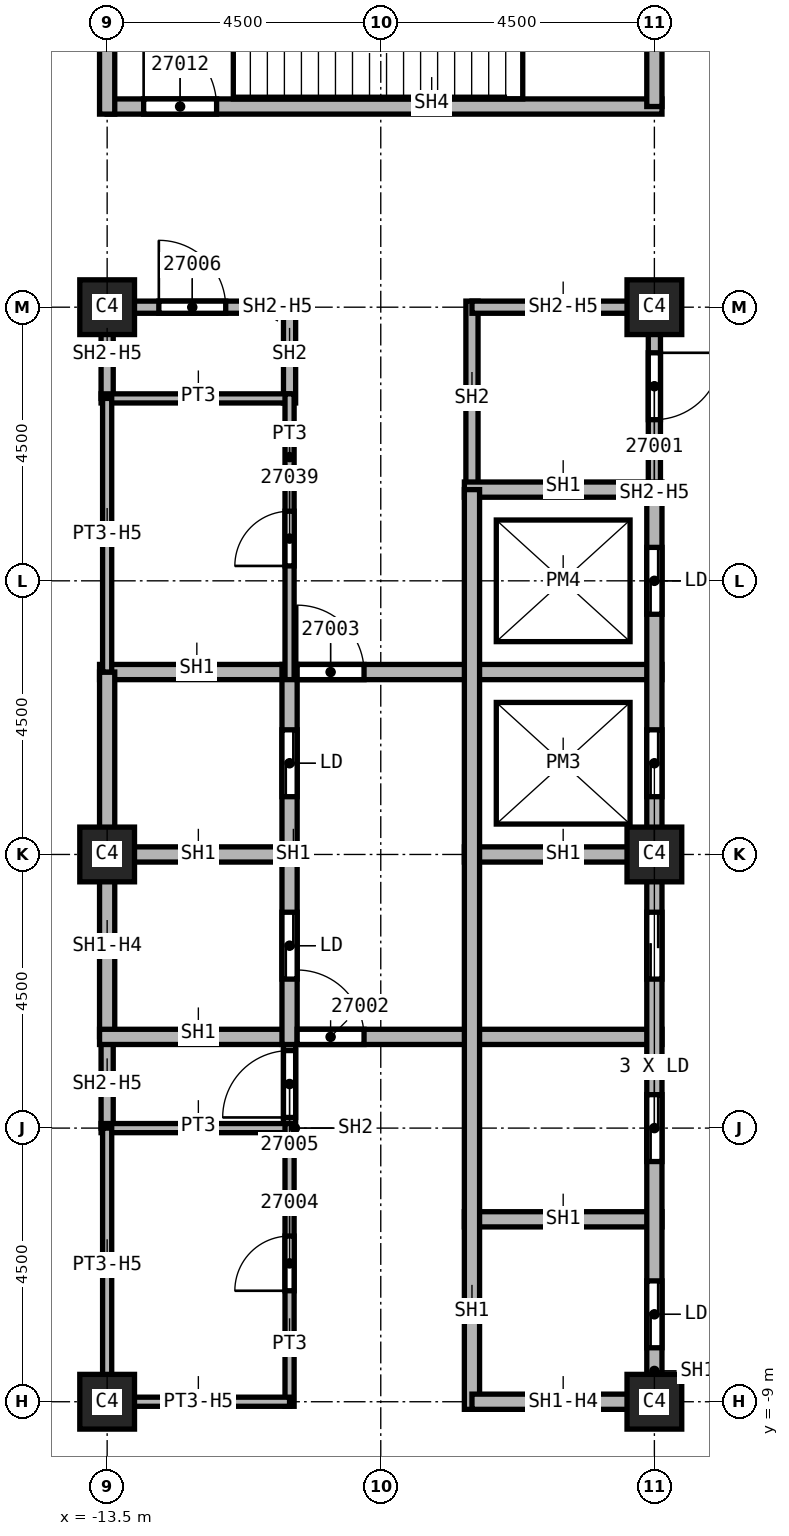
"""IFC4 building model, lengths in metres.
Left out: names, types, materials, properties, quantities, classifications, styles, units other than length and angle.
Written with IfcOpenShell. Run it as: python <this file> out.ifc"""

import sys

from ifc_helpers import new_model, si_unit, direction, frame, frame_2d, origin, origin_2d, place, context, subcontext, project, spatial, rectangle, extrude, element, fill, save


model = new_model("IFC4")
c1 = context("Model", 3, precision=1e-05, world=origin(), true_north=direction((0.0, 1.0)))
c2 = subcontext(c1, "Body", "Model", "MODEL_VIEW")
j1 = project(units=[si_unit("LENGTHUNIT", "METRE"), si_unit("PLANEANGLEUNIT", "RADIAN")], contexts=[c1])
p1 = place(None, origin())
s1 = spatial("IfcSite", under=j1, at=p1, CompositionType="ELEMENT")
p2 = place(p1, origin())
s2 = spatial("IfcBuilding", under=s1, at=p2, CompositionType="ELEMENT")
p3 = place(p2, frame((0.0, 0.0, 178.0)))
s3 = spatial("IfcBuildingStorey", under=s2, at=p3, CompositionType="ELEMENT", Elevation=178.0)
for number, where, z_axis, x_axis in (
    (1, (-4.5, 0.0, 0.0), (0.0, 0.0, 1.0), (1.0, 0.0, 0.0)),
    (2, (-4.5, 9.0, 0.0), (0.0, 0.0, 1.0), (1.0, 0.0, 0.0)),
    (3, (-4.5, -9.0, 0.0), (0.0, 0.0, 1.0), (1.0, 0.0, 0.0)),
    (4, (-13.5, 0.0, 0.0), (0.0, 0.0, 1.0), (1.0, 0.0, 0.0)),
    (5, (-13.5, 9.0, 0.0), (0.0, 0.0, 1.0), (1.0, 0.0, 0.0)),
    (6, (-13.5, -9.0, 0.0), (0.0, 0.0, 1.0), (1.0, 0.0, 0.0)),
):
    element("IfcColumn", number, at=place(p3, frame(where, z_axis=z_axis, x_axis=x_axis)), inside=s3, PredefinedType="COLUMN", context=c2, shape_type="SweptSolid", body=[
        extrude(rectangle(XDim=0.9, YDim=0.9, at=origin_2d()), origin(), (0.0, 0.0, 1.0), 5.72),
    ])
p4 = place(p3, frame((-13.5, -4.5, 0.0), z_axis=(0.0, 0.0, 1.0), x_axis=(0.0, 1.0, 0.0)))
e7 = element("IfcWall", 7, at=p4, inside=s3, PredefinedType="SOLIDWALL", context=c2, shape_type="SweptSolid", body=[
    extrude(rectangle(XDim=1.5, YDim=0.2, at=frame_2d((0.75, 0.0))), origin(), (0.0, 0.0, 1.0), 4.958),
])
p5 = place(p3, frame((-13.5, 7.5, 0.0), z_axis=(0.0, 0.0, 1.0), x_axis=(0.0, 1.0, 0.0)))
e8 = element("IfcWall", 8, at=p5, inside=s3, PredefinedType="SOLIDWALL", context=c2, shape_type="SweptSolid", body=[
    extrude(rectangle(XDim=1.6, YDim=0.2, at=frame_2d((0.8, 0.0))), origin(), (0.0, 0.0, 1.0), 4.958),
])
p6 = place(p3, frame((-13.5, 9.0, 0.0), z_axis=(0.0, 0.0, 1.0), x_axis=(1.0, 0.0, 0.0)))
e9 = element("IfcWall", 9, at=p6, inside=s3, PredefinedType="SOLIDWALL", context=c2, shape_type="SweptSolid", body=[
    extrude(rectangle(XDim=3.0, YDim=0.2, at=frame_2d((1.5, 0.0))), origin(), (0.0, 0.0, 1.0), 4.958),
])
p7 = place(p6, frame((0.85, 0.0, 0.0)))
e10 = element("IfcOpeningElement", 10, at=p7, cuts=e9, PredefinedType="OPENING", context=c2, shape_type="SweptSolid", body=[
    extrude(rectangle(XDim=1.1, YDim=2.1, at=frame_2d((0.55, 1.05))), frame((0.0, 0.1, 0.0), z_axis=(0.0, -1.0, 0.0), x_axis=(1.0, 0.0, 0.0)), (0.0, 0.0, 1.0), 0.2),
])
p8 = place(p3, frame((-10.5, -4.575, 0.0), z_axis=(0.0, 0.0, 1.0), x_axis=(0.0, 1.0, 0.0)))
e11 = element("IfcWall", 11, at=p8, inside=s3, PredefinedType="SOLIDWALL", context=c2, shape_type="SweptSolid", body=[
    extrude(rectangle(XDim=1.7, YDim=0.2, at=frame_2d((0.85, 0.0))), origin(), (0.0, 0.0, 1.0), 5.72),
])
p9 = place(p8, frame((0.25, 0.0, 0.0)))
e12 = element("IfcOpeningElement", 12, at=p9, cuts=e11, PredefinedType="OPENING", context=c2, shape_type="SweptSolid", body=[
    extrude(rectangle(XDim=1.1, YDim=2.1, at=frame_2d((0.55, 1.05))), frame((0.0, 0.1, 0.0), z_axis=(0.0, -1.0, 0.0), x_axis=(1.0, 0.0, 0.0)), (0.0, 0.0, 1.0), 0.2),
])
p10 = place(p3, frame((-10.5, 7.425, 0.0), z_axis=(0.0, 0.0, 1.0), x_axis=(0.0, 1.0, 0.0)))
e13 = element("IfcWall", 13, at=p10, inside=s3, PredefinedType="SOLIDWALL", context=c2, shape_type="SweptSolid", body=[
    extrude(rectangle(XDim=1.675, YDim=0.2, at=frame_2d((0.837, 0.0))), origin(), (0.0, 0.0, 1.0), 5.72),
])
p11 = place(p3, frame((-7.5, 6.0, 0.0), z_axis=(0.0, 0.0, 1.0), x_axis=(0.0, 1.0, 0.0)))
e14 = element("IfcWall", 14, at=p11, inside=s3, PredefinedType="SOLIDWALL", context=c2, shape_type="SweptSolid", body=[
    extrude(rectangle(XDim=3.1, YDim=0.2, at=frame_2d((1.55, 0.0))), origin(), (0.0, 0.0, 1.0), 5.72),
])
p12 = place(p3, frame((-7.5, 9.0, 0.0), z_axis=(0.0, 0.0, 1.0), x_axis=(1.0, 0.0, 0.0)))
e15 = element("IfcWall", 15, at=p12, inside=s3, PredefinedType="SOLIDWALL", context=c2, shape_type="SweptSolid", body=[
    extrude(rectangle(XDim=3.0, YDim=0.2, at=frame_2d((1.5, 0.0))), origin(), (0.0, 0.0, 1.0), 4.958),
])
p13 = place(p3, frame((-4.5, 9.1, 0.0), z_axis=(0.0, 0.0, 1.0), x_axis=(0.0, -1.0, 0.0)))
e16 = element("IfcWall", 16, at=p13, inside=s3, PredefinedType="SOLIDWALL", context=c2, shape_type="SweptSolid", body=[
    extrude(rectangle(XDim=3.1, YDim=0.2, at=frame_2d((1.55, 0.0))), origin(), (0.0, 0.0, 1.0), 4.958),
])
p14 = place(p13, frame((0.85, 0.0, 0.0)))
e17 = element("IfcOpeningElement", 17, at=p14, cuts=e16, PredefinedType="OPENING", context=c2, shape_type="SweptSolid", body=[
    extrude(rectangle(XDim=1.1, YDim=2.1, at=frame_2d((0.55, 1.05))), frame((0.0, 0.1, 0.0), z_axis=(0.0, -1.0, 0.0), x_axis=(1.0, 0.0, 0.0)), (0.0, 0.0, 1.0), 0.2),
])
p15 = place(p3, frame((-13.625, 0.0, 0.0), z_axis=(0.0, 0.0, 1.0), x_axis=(1.0, 0.0, 0.0)))
e18 = element("IfcWall", 18, at=p15, inside=s3, PredefinedType="SOLIDWALL", context=c2, shape_type="SweptSolid", body=[
    extrude(rectangle(XDim=3.125, YDim=0.25, at=frame_2d((1.562, 0.0))), origin(), (0.0, 0.0, 1.0), 5.72),
])
p16 = place(p3, frame((-13.625, 3.0, 0.0), z_axis=(0.0, 0.0, 1.0), x_axis=(1.0, 0.0, 0.0)))
e19 = element("IfcWall", 19, at=p16, inside=s3, PredefinedType="SOLIDWALL", context=c2, shape_type="SweptSolid", body=[
    extrude(rectangle(XDim=9.25, YDim=0.25, at=frame_2d((4.625, 0.0))), origin(), (0.0, 0.0, 1.0), 5.72),
])
p17 = place(p16, frame((3.25, 0.0, 0.0)))
e20 = element("IfcOpeningElement", 20, at=p17, cuts=e19, PredefinedType="OPENING", context=c2, shape_type="SweptSolid", body=[
    extrude(rectangle(XDim=1.1, YDim=2.1, at=frame_2d((0.55, 1.05))), frame((0.0, 0.125, 0.0), z_axis=(0.0, -1.0, 0.0), x_axis=(1.0, 0.0, 0.0)), (0.0, 0.0, 1.0), 0.25),
])
p18 = place(p3, frame((-13.5, -3.0, 0.0), z_axis=(0.0, 0.0, 1.0), x_axis=(0.0, 1.0, 0.0)))
e21 = element("IfcWall", 21, at=p18, inside=s3, PredefinedType="SOLIDWALL", context=c2, shape_type="SweptSolid", body=[
    extrude(rectangle(XDim=6.0, YDim=0.25, at=frame_2d((3.0, 0.0))), origin(), (0.0, 0.0, 1.0), 4.958),
])
p19 = place(p3, frame((-13.625, -3.0, 0.0), z_axis=(0.0, 0.0, 1.0), x_axis=(1.0, 0.0, 0.0)))
e22 = element("IfcWall", 22, at=p19, inside=s3, PredefinedType="SOLIDWALL", context=c2, shape_type="SweptSolid", body=[
    extrude(rectangle(XDim=9.25, YDim=0.25, at=frame_2d((4.625, 0.0))), origin(), (0.0, 0.0, 1.0), 5.72),
])
p20 = place(p19, frame((3.25, 0.0, 0.0)))
e23 = element("IfcOpeningElement", 23, at=p20, cuts=e22, PredefinedType="OPENING", context=c2, shape_type="SweptSolid", body=[
    extrude(rectangle(XDim=1.1, YDim=2.1, at=frame_2d((0.55, 1.05))), frame((0.0, 0.125, 0.0), z_axis=(0.0, -1.0, 0.0), x_axis=(1.0, 0.0, 0.0)), (0.0, 0.0, 1.0), 0.25),
])
p21 = place(p3, frame((-10.5, -3.125, 0.0), z_axis=(0.0, 0.0, 1.0), x_axis=(0.0, 1.0, 0.0)))
e24 = element("IfcWall", 24, at=p21, inside=s3, PredefinedType="SOLIDWALL", context=c2, shape_type="SweptSolid", body=[
    extrude(rectangle(XDim=6.25, YDim=0.25, at=frame_2d((3.125, 0.0))), origin(), (0.0, 0.0, 1.0), 5.72),
])
p22 = place(p21, frame((1.075, 0.0, 0.0)))
e25 = element("IfcOpeningElement", 25, at=p22, cuts=e24, PredefinedType="OPENING", context=c2, shape_type="SweptSolid", body=[
    extrude(rectangle(XDim=1.1, YDim=2.1, at=frame_2d((0.55, 1.05))), frame((0.0, 0.125, 0.0), z_axis=(0.0, -1.0, 0.0), x_axis=(1.0, 0.0, 0.0)), (0.0, 0.0, 1.0), 0.25),
])
p23 = place(p21, frame((4.075, 0.0, 0.0)))
e26 = element("IfcOpeningElement", 26, at=p23, cuts=e24, PredefinedType="OPENING", context=c2, shape_type="SweptSolid", body=[
    extrude(rectangle(XDim=1.1, YDim=2.1, at=frame_2d((0.55, 1.05))), frame((0.0, 0.125, 0.0), z_axis=(0.0, -1.0, 0.0), x_axis=(1.0, 0.0, 0.0)), (0.0, 0.0, 1.0), 0.25),
])
for number, where, z_axis, x_axis in (
    (27, (-7.625, -6.0, 0.0), (0.0, 0.0, 1.0), (1.0, 0.0, 0.0)),
    (28, (-7.625, 0.0, 0.0), (0.0, 0.0, 1.0), (1.0, 0.0, 0.0)),
    (29, (-7.625, 6.0, 0.0), (0.0, 0.0, 1.0), (1.0, 0.0, 0.0)),
):
    element("IfcWall", number, at=place(p3, frame(where, z_axis=z_axis, x_axis=x_axis)), inside=s3, PredefinedType="SOLIDWALL", context=c2, shape_type="SweptSolid", body=[
        extrude(rectangle(XDim=3.25, YDim=0.25, at=frame_2d((1.625, 0.0))), origin(), (0.0, 0.0, 1.0), 5.72),
    ])
p24 = place(p3, frame((-7.5, -9.125, 0.0), z_axis=(0.0, 0.0, 1.0), x_axis=(0.0, 1.0, 0.0)))
e30 = element("IfcWall", 30, at=p24, inside=s3, PredefinedType="SOLIDWALL", context=c2, shape_type="SweptSolid", body=[
    extrude(rectangle(XDim=15.125, YDim=0.25, at=frame_2d((7.562, 0.0))), origin(), (0.0, 0.0, 1.0), 5.72),
])
p25 = place(p3, frame((-4.5, -9.0, 0.0), z_axis=(0.0, 0.0, 1.0), x_axis=(-1.0, 0.0, 0.0)))
e31 = element("IfcWall", 31, at=p25, inside=s3, PredefinedType="SOLIDWALL", context=c2, shape_type="SweptSolid", body=[
    extrude(rectangle(XDim=3.0, YDim=0.25, at=frame_2d((1.5, 0.0))), origin(), (0.0, 0.0, 1.0), 4.958),
])
p26 = place(p3, frame((-4.5, 6.0, 0.0), z_axis=(0.0, 0.0, 1.0), x_axis=(0.0, -1.0, 0.0)))
e32 = element("IfcWall", 32, at=p26, inside=s3, PredefinedType="SOLIDWALL", context=c2, shape_type="SweptSolid", body=[
    extrude(rectangle(XDim=15.125, YDim=0.25, at=frame_2d((7.562, 0.0))), origin(), (0.0, 0.0, 1.0), 4.958),
])
p27 = place(p26, frame((13.012, 0.0, 0.0)))
e33 = element("IfcOpeningElement", 33, at=p27, cuts=e32, PredefinedType="OPENING", context=c2, shape_type="SweptSolid", body=[
    extrude(rectangle(XDim=1.1, YDim=2.1, at=frame_2d((0.55, 1.05))), frame((0.0, 0.125, 0.0), z_axis=(0.0, -1.0, 0.0), x_axis=(1.0, 0.0, 0.0)), (0.0, 0.0, 1.0), 0.25),
])
p28 = place(p26, frame((9.95, 0.0, 0.0)))
e34 = element("IfcOpeningElement", 34, at=p28, cuts=e32, PredefinedType="OPENING", context=c2, shape_type="SweptSolid", body=[
    extrude(rectangle(XDim=1.1, YDim=2.1, at=frame_2d((0.55, 1.05))), frame((0.0, 0.125, 0.0), z_axis=(0.0, -1.0, 0.0), x_axis=(1.0, 0.0, 0.0)), (0.0, 0.0, 1.0), 0.25),
])
p29 = place(p26, frame((6.95, 0.0, 0.0)))
e35 = element("IfcOpeningElement", 35, at=p29, cuts=e32, PredefinedType="OPENING", context=c2, shape_type="SweptSolid", body=[
    extrude(rectangle(XDim=1.1, YDim=2.1, at=frame_2d((0.55, 1.05))), frame((0.0, 0.125, 0.0), z_axis=(0.0, -1.0, 0.0), x_axis=(1.0, 0.0, 0.0)), (0.0, 0.0, 1.0), 0.25),
])
p30 = place(p26, frame((3.95, 0.0, 0.0)))
e36 = element("IfcOpeningElement", 36, at=p30, cuts=e32, PredefinedType="OPENING", context=c2, shape_type="SweptSolid", body=[
    extrude(rectangle(XDim=1.1, YDim=2.1, at=frame_2d((0.55, 1.05))), frame((0.0, 0.125, 0.0), z_axis=(0.0, -1.0, 0.0), x_axis=(1.0, 0.0, 0.0)), (0.0, 0.0, 1.0), 0.25),
])
p31 = place(p26, frame((0.95, 0.0, 0.0)))
e37 = element("IfcOpeningElement", 37, at=p31, cuts=e32, PredefinedType="OPENING", context=c2, shape_type="SweptSolid", body=[
    extrude(rectangle(XDim=1.1, YDim=2.1, at=frame_2d((0.55, 1.05))), frame((0.0, 0.125, 0.0), z_axis=(0.0, -1.0, 0.0), x_axis=(1.0, 0.0, 0.0)), (0.0, 0.0, 1.0), 0.25),
])
p32 = place(p3, frame((-13.5, 12.3, 0.0), z_axis=(0.0, 0.0, 1.0), x_axis=(1.0, 0.0, 0.0)))
e38 = element("IfcWall", 38, at=p32, inside=s3, PredefinedType="SOLIDWALL", context=c2, shape_type="SweptSolid", body=[
    extrude(rectangle(XDim=9.125, YDim=0.25, at=frame_2d((4.562, 0.0))), origin(), (0.0, 0.0, 1.0), 5.72),
])
p33 = place(p32, frame((0.6, 0.0, 0.0)))
e39 = element("IfcOpeningElement", 39, at=p33, cuts=e38, PredefinedType="OPENING", context=c2, shape_type="SweptSolid", body=[
    extrude(rectangle(XDim=1.2, YDim=2.1, at=frame_2d((0.6, 1.05))), frame((0.0, 0.125, 0.0), z_axis=(0.0, -1.0, 0.0), x_axis=(1.0, 0.0, 0.0)), (0.0, 0.0, 1.0), 0.25),
])
p34 = place(p3, frame((-13.5, 16.78, 0.0), z_axis=(0.0, 0.0, 1.0), x_axis=(0.0, -1.0, 0.0)))
e40 = element("IfcWall", 40, at=p34, inside=s3, PredefinedType="SOLIDWALL", context=c2, shape_type="SweptSolid", body=[
    extrude(rectangle(XDim=4.605, YDim=0.25, at=frame_2d((2.302, 0.0))), origin(), (0.0, 0.0, 1.0), 5.72),
])
p35 = place(p3, frame((-4.5, 14.533, 0.0), z_axis=(0.0, 0.0, 1.0), x_axis=(0.0, -1.0, 0.0)))
e41 = element("IfcWall", 41, at=p35, inside=s3, PredefinedType="SOLIDWALL", context=c2, shape_type="SweptSolid", body=[
    extrude(rectangle(XDim=2.233, YDim=0.25, at=frame_2d((1.116, 0.0))), origin(), (0.0, 0.0, 1.0), 5.72),
])
for number, where, z_axis, x_axis in (
    (42, (-13.6, -4.5, 0.0), (0.0, 0.0, 1.0), (1.0, 0.0, 0.0)),
    (43, (-13.6, 7.5, 0.0), (0.0, 0.0, 1.0), (1.0, 0.0, 0.0)),
):
    element("IfcWall", number, at=place(p3, frame(where, z_axis=z_axis, x_axis=x_axis)), inside=s3, PredefinedType="PARTITIONING", context=c2, shape_type="SweptSolid", body=[
        extrude(rectangle(XDim=3.1, YDim=0.15, at=frame_2d((1.55, 0.0))), origin(), (0.0, 0.0, 1.0), 5.72),
    ])
p36 = place(p3, frame((-13.5, -9.075, 0.0), z_axis=(0.0, 0.0, 1.0), x_axis=(0.0, 1.0, 0.0)))
e44 = element("IfcWall", 44, at=p36, inside=s3, PredefinedType="PARTITIONING", context=c2, shape_type="SweptSolid", body=[
    extrude(rectangle(XDim=4.575, YDim=0.15, at=frame_2d((2.288, 0.0))), origin(), (0.0, 0.0, 1.0), 4.958),
])
p37 = place(p3, frame((-13.5, 3.0, 0.0), z_axis=(0.0, 0.0, 1.0), x_axis=(0.0, 1.0, 0.0)))
e45 = element("IfcWall", 45, at=p37, inside=s3, PredefinedType="PARTITIONING", context=c2, shape_type="SweptSolid", body=[
    extrude(rectangle(XDim=4.5, YDim=0.15, at=frame_2d((2.25, 0.0))), origin(), (0.0, 0.0, 1.0), 4.958),
])
p38 = place(p3, frame((-10.5, -9.075, 0.0), z_axis=(0.0, 0.0, 1.0), x_axis=(0.0, 1.0, 0.0)))
e46 = element("IfcWall", 46, at=p38, inside=s3, PredefinedType="PARTITIONING", context=c2, shape_type="SweptSolid", body=[
    extrude(rectangle(XDim=4.65, YDim=0.15, at=frame_2d((2.325, 0.0))), origin(), (0.0, 0.0, 1.0), 5.72),
])
p39 = place(p38, frame((1.9, 0.0, 0.0)))
e47 = element("IfcOpeningElement", 47, at=p39, cuts=e46, PredefinedType="OPENING", context=c2, shape_type="SweptSolid", body=[
    extrude(rectangle(XDim=0.9, YDim=2.1, at=frame_2d((0.45, 1.05))), frame((0.0, 0.075, 0.0), z_axis=(0.0, -1.0, 0.0), x_axis=(1.0, 0.0, 0.0)), (0.0, 0.0, 1.0), 0.15),
])
p40 = place(p3, frame((-10.5, -9.0, 0.0), z_axis=(0.0, 0.0, 1.0), x_axis=(-1.0, 0.0, 0.0)))
e48 = element("IfcWall", 48, at=p40, inside=s3, PredefinedType="PARTITIONING", context=c2, shape_type="SweptSolid", body=[
    extrude(rectangle(XDim=3.0, YDim=0.15, at=frame_2d((1.5, 0.0))), origin(), (0.0, 0.0, 1.0), 4.958),
])
p41 = place(p3, frame((-10.5, 2.875, 0.0), z_axis=(0.0, 0.0, 1.0), x_axis=(0.0, 1.0, 0.0)))
e49 = element("IfcWall", 49, at=p41, inside=s3, PredefinedType="PARTITIONING", context=c2, shape_type="SweptSolid", body=[
    extrude(rectangle(XDim=4.7, YDim=0.15, at=frame_2d((2.35, 0.0))), origin(), (0.0, 0.0, 1.0), 5.72),
])
p42 = place(p41, frame((1.87, 0.0, 0.0)))
e50 = element("IfcOpeningElement", 50, at=p42, cuts=e49, PredefinedType="OPENING", context=c2, shape_type="SweptSolid", body=[
    extrude(rectangle(XDim=0.9, YDim=2.1, at=frame_2d((0.45, 1.05))), frame((0.0, 0.075, 0.0), z_axis=(0.0, -1.0, 0.0), x_axis=(1.0, 0.0, 0.0)), (0.0, 0.0, 1.0), 0.15),
])
p43 = place(p14, origin())
e51 = element("IfcDoor", 51, at=p43, inside=s3, OperationType="SINGLE_SWING_RIGHT", PredefinedType="DOOR", context=c2, shape_type="SweptSolid", body=[
    extrude(rectangle(XDim=1.1, YDim=2.1, at=frame_2d((0.55, 1.05))), frame((0.0, 0.025, 0.0), z_axis=(0.0, -1.0, 0.0), x_axis=(1.0, 0.0, 0.0)), (0.0, 0.0, 1.0), 0.05),
])
fill(e17, e51)
p44 = place(p20, origin())
e52 = element("IfcDoor", 52, at=p44, inside=s3, OperationType="SINGLE_SWING_LEFT", PredefinedType="DOOR", context=c2, shape_type="SweptSolid", body=[
    extrude(rectangle(XDim=1.1, YDim=2.1, at=frame_2d((0.55, 1.05))), frame((0.0, 0.025, 0.0), z_axis=(0.0, -1.0, 0.0), x_axis=(1.0, 0.0, 0.0)), (0.0, 0.0, 1.0), 0.05),
])
fill(e23, e52)
p45 = place(p17, origin())
e53 = element("IfcDoor", 53, at=p45, inside=s3, OperationType="SINGLE_SWING_RIGHT", PredefinedType="DOOR", context=c2, shape_type="SweptSolid", body=[
    extrude(rectangle(XDim=1.1, YDim=2.1, at=frame_2d((0.55, 1.05))), frame((0.0, 0.025, 0.0), z_axis=(0.0, -1.0, 0.0), x_axis=(1.0, 0.0, 0.0)), (0.0, 0.0, 1.0), 0.05),
])
fill(e20, e53)
p46 = place(p39, origin())
e54 = element("IfcDoor", 54, at=p46, inside=s3, OperationType="SINGLE_SWING_LEFT", PredefinedType="DOOR", context=c2, shape_type="SweptSolid", body=[
    extrude(rectangle(XDim=0.9, YDim=2.1, at=frame_2d((0.45, 1.05))), frame((0.0, 0.025, 0.0), z_axis=(0.0, -1.0, 0.0), x_axis=(1.0, 0.0, 0.0)), (0.0, 0.0, 1.0), 0.05),
])
fill(e47, e54)
p47 = place(p9, origin())
e55 = element("IfcDoor", 55, at=p47, inside=s3, OperationType="SINGLE_SWING_RIGHT", PredefinedType="DOOR", context=c2, shape_type="SweptSolid", body=[
    extrude(rectangle(XDim=1.1, YDim=2.1, at=frame_2d((0.55, 1.05))), frame((0.0, 0.025, 0.0), z_axis=(0.0, -1.0, 0.0), x_axis=(1.0, 0.0, 0.0)), (0.0, 0.0, 1.0), 0.05),
])
fill(e12, e55)
p48 = place(p7, origin())
e56 = element("IfcDoor", 56, at=p48, inside=s3, OperationType="SINGLE_SWING_LEFT", PredefinedType="DOOR", context=c2, shape_type="SweptSolid", body=[
    extrude(rectangle(XDim=1.1, YDim=2.1, at=frame_2d((0.55, 1.05))), frame((0.0, 0.025, 0.0), z_axis=(0.0, -1.0, 0.0), x_axis=(1.0, 0.0, 0.0)), (0.0, 0.0, 1.0), 0.05),
])
fill(e10, e56)
p49 = place(p33, origin())
e57 = element("IfcDoor", 57, at=p49, inside=s3, OperationType="SINGLE_SWING_LEFT", PredefinedType="DOOR", context=c2, shape_type="SweptSolid", body=[
    extrude(rectangle(XDim=1.2, YDim=2.1, at=frame_2d((0.6, 1.05))), frame((0.0, 0.025, 0.0), z_axis=(0.0, -1.0, 0.0), x_axis=(1.0, 0.0, 0.0)), (0.0, 0.0, 1.0), 0.05),
])
fill(e39, e57)
p50 = place(p42, origin())
e58 = element("IfcDoor", 58, at=p50, inside=s3, OperationType="SINGLE_SWING_LEFT", PredefinedType="DOOR", context=c2, shape_type="SweptSolid", body=[
    extrude(rectangle(XDim=0.9, YDim=2.1, at=frame_2d((0.45, 1.05))), frame((0.0, 0.025, 0.0), z_axis=(0.0, -1.0, 0.0), x_axis=(1.0, 0.0, 0.0)), (0.0, 0.0, 1.0), 0.05),
])
fill(e50, e58)
p51 = place(p27, origin())
e59 = element("IfcDoor", 59, at=p51, inside=s3, OperationType="SLIDING_TO_LEFT", PredefinedType="DOOR", context=c2, shape_type="SweptSolid", body=[
    extrude(rectangle(XDim=1.1, YDim=2.1, at=frame_2d((0.55, 1.05))), frame((0.0, 0.025, 0.0), z_axis=(0.0, -1.0, 0.0), x_axis=(1.0, 0.0, 0.0)), (0.0, 0.0, 1.0), 0.05),
])
fill(e33, e59)
p52 = place(p28, origin())
e60 = element("IfcDoor", 60, at=p52, inside=s3, OperationType="SLIDING_TO_LEFT", PredefinedType="DOOR", context=c2, shape_type="SweptSolid", body=[
    extrude(rectangle(XDim=1.1, YDim=2.1, at=frame_2d((0.55, 1.05))), frame((0.0, 0.025, 0.0), z_axis=(0.0, -1.0, 0.0), x_axis=(1.0, 0.0, 0.0)), (0.0, 0.0, 1.0), 0.05),
])
fill(e34, e60)
p53 = place(p29, origin())
e61 = element("IfcDoor", 61, at=p53, inside=s3, OperationType="SLIDING_TO_LEFT", PredefinedType="DOOR", context=c2, shape_type="SweptSolid", body=[
    extrude(rectangle(XDim=1.1, YDim=2.1, at=frame_2d((0.55, 1.05))), frame((0.0, 0.025, 0.0), z_axis=(0.0, -1.0, 0.0), x_axis=(1.0, 0.0, 0.0)), (0.0, 0.0, 1.0), 0.05),
])
fill(e35, e61)
p54 = place(p30, origin())
e62 = element("IfcDoor", 62, at=p54, inside=s3, OperationType="SLIDING_TO_LEFT", PredefinedType="DOOR", context=c2, shape_type="SweptSolid", body=[
    extrude(rectangle(XDim=1.1, YDim=2.1, at=frame_2d((0.55, 1.05))), frame((0.0, 0.025, 0.0), z_axis=(0.0, -1.0, 0.0), x_axis=(1.0, 0.0, 0.0)), (0.0, 0.0, 1.0), 0.05),
])
fill(e36, e62)
p55 = place(p31, origin())
e63 = element("IfcDoor", 63, at=p55, inside=s3, OperationType="SLIDING_TO_LEFT", PredefinedType="DOOR", context=c2, shape_type="SweptSolid", body=[
    extrude(rectangle(XDim=1.1, YDim=2.1, at=frame_2d((0.55, 1.05))), frame((0.0, 0.025, 0.0), z_axis=(0.0, -1.0, 0.0), x_axis=(1.0, 0.0, 0.0)), (0.0, 0.0, 1.0), 0.05),
])
fill(e37, e63)
p56 = place(p22, origin())
e64 = element("IfcDoor", 64, at=p56, inside=s3, OperationType="SLIDING_TO_LEFT", PredefinedType="DOOR", context=c2, shape_type="SweptSolid", body=[
    extrude(rectangle(XDim=1.1, YDim=2.1, at=frame_2d((0.55, 1.05))), frame((0.0, 0.025, 0.0), z_axis=(0.0, -1.0, 0.0), x_axis=(1.0, 0.0, 0.0)), (0.0, 0.0, 1.0), 0.05),
])
fill(e25, e64)
p57 = place(p23, origin())
e65 = element("IfcDoor", 65, at=p57, inside=s3, OperationType="SLIDING_TO_LEFT", PredefinedType="DOOR", context=c2, shape_type="SweptSolid", body=[
    extrude(rectangle(XDim=1.1, YDim=2.1, at=frame_2d((0.55, 1.05))), frame((0.0, 0.025, 0.0), z_axis=(0.0, -1.0, 0.0), x_axis=(1.0, 0.0, 0.0)), (0.0, 0.0, 1.0), 0.05),
])
fill(e26, e65)
save(model, sys.argv[1])
